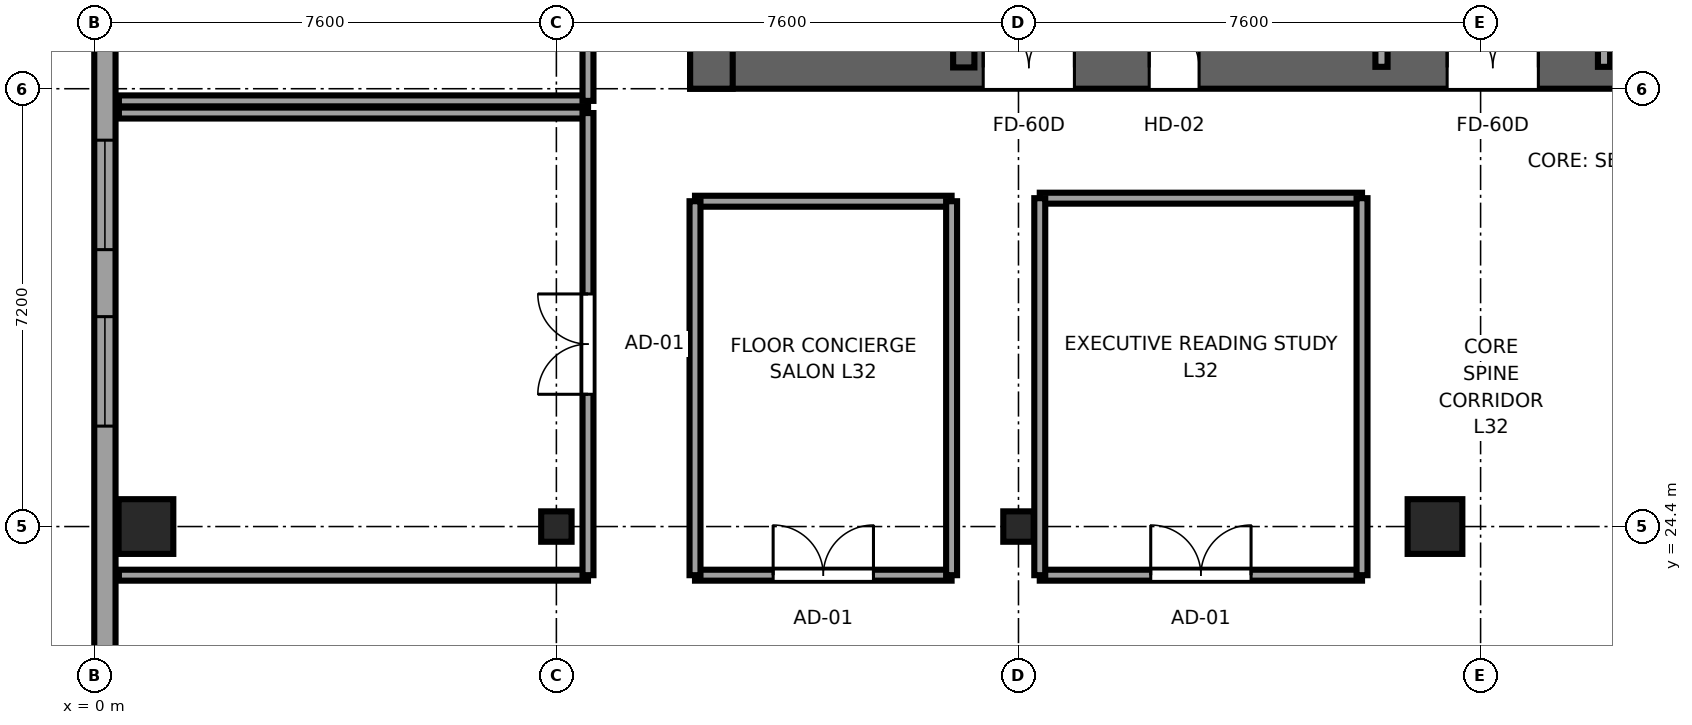
"""IFC4 building model, lengths in metres.
Left out: names, types, materials, properties, quantities, classifications, styles, units other than length and angle.
Written with IfcOpenShell. Run it as: python <this file> out.ifc"""

import sys

from ifc_helpers import new_model, si_unit, direction, frame, frame_2d, origin, origin_2d, place, context, subcontext, project, spatial, rectangle, i_section, extrude, source, transform, mapped, element, fill, save


model = new_model("IFC4")
c1 = context("Model", 3, precision=1e-05, world=origin(), true_north=direction((0.0, 1.0)))
c2 = subcontext(c1, "Body", "Model", "MODEL_VIEW")
j1 = project(units=[si_unit("LENGTHUNIT", "METRE"), si_unit("PLANEANGLEUNIT", "RADIAN")], contexts=[c1])
p1 = place(None, origin())
s1 = spatial("IfcSite", under=j1, at=p1, CompositionType="ELEMENT")
p2 = place(p1, origin())
s2 = spatial("IfcBuilding", under=s1, at=p2, CompositionType="ELEMENT")
p3 = place(p2, frame((0.0, 0.0, 125.75)))
s3 = spatial("IfcBuildingStorey", under=s2, at=p3, CompositionType="ELEMENT", Elevation=125.75)
p4 = place(p3, frame((9.8, 31.95, 0.0), z_axis=(0.0, 0.0, 1.0), x_axis=(1.0, 0.0, 0.0)))
e1 = element("IfcWall", 1, at=p4, inside=s3, PredefinedType="SHEAR", context=c2, shape_type="SweptSolid", body=[
    extrude(rectangle(XDim=26.4, YDim=0.7, at=frame_2d((13.2, 0.0))), origin(), (0.0, 0.0, 1.0), 3.55),
])
p5 = place(p4, frame((6.32, 0.0, 0.0), z_axis=(0.0, 0.0, 1.0), x_axis=(-1.0, 0.0, 0.0)))
e2 = element("IfcOpeningElement", 2, at=p5, cuts=e1, PredefinedType="OPENING", context=c2, shape_type="SweptSolid", body=[
    extrude(rectangle(XDim=1.5, YDim=2.04, at=frame_2d((0.75, 1.02))), frame((0.0, 0.36, 0.0), z_axis=(0.0, -1.0, 0.0), x_axis=(1.0, 0.0, 0.0)), (0.0, 0.0, 1.0), 0.72),
])
p6 = place(p4, frame((13.95, 0.0, 0.0), z_axis=(0.0, 0.0, 1.0), x_axis=(-1.0, 0.0, 0.0)))
e3 = element("IfcOpeningElement", 3, at=p6, cuts=e1, PredefinedType="OPENING", context=c2, shape_type="SweptSolid", body=[
    extrude(rectangle(XDim=1.5, YDim=2.04, at=frame_2d((0.75, 1.02))), frame((0.0, 0.36, 0.0), z_axis=(0.0, -1.0, 0.0), x_axis=(1.0, 0.0, 0.0)), (0.0, 0.0, 1.0), 0.72),
])
p7 = place(p4, frame((21.58, 0.0, 0.0), z_axis=(0.0, 0.0, 1.0), x_axis=(-1.0, 0.0, 0.0)))
e4 = element("IfcOpeningElement", 4, at=p7, cuts=e1, PredefinedType="OPENING", context=c2, shape_type="SweptSolid", body=[
    extrude(rectangle(XDim=1.5, YDim=2.04, at=frame_2d((0.75, 1.02))), frame((0.0, 0.36, 0.0), z_axis=(0.0, -1.0, 0.0), x_axis=(1.0, 0.0, 0.0)), (0.0, 0.0, 1.0), 0.72),
])
p8 = place(p4, frame((8.37, 0.0, 0.0), z_axis=(0.0, 0.0, 1.0), x_axis=(-1.0, 0.0, 0.0)))
e5 = element("IfcOpeningElement", 5, at=p8, cuts=e1, PredefinedType="OPENING", context=c2, shape_type="SweptSolid", body=[
    extrude(rectangle(XDim=0.82, YDim=2.01, at=frame_2d((0.41, 1.005))), frame((0.0, 0.36, 0.0), z_axis=(0.0, -1.0, 0.0), x_axis=(1.0, 0.0, 0.0)), (0.0, 0.0, 1.0), 0.72),
])
p9 = place(p4, frame((18.87, 0.0, 0.0), z_axis=(0.0, 0.0, 1.0), x_axis=(-1.0, 0.0, 0.0)))
e6 = element("IfcOpeningElement", 6, at=p9, cuts=e1, PredefinedType="OPENING", context=c2, shape_type="SweptSolid", body=[
    extrude(rectangle(XDim=0.82, YDim=2.01, at=frame_2d((0.41, 1.005))), frame((0.0, 0.36, 0.0), z_axis=(0.0, -1.0, 0.0), x_axis=(1.0, 0.0, 0.0)), (0.0, 0.0, 1.0), 0.72),
])
p10 = place(p3, frame((10.15, 31.6, 0.0), z_axis=(0.0, 0.0, 1.0), x_axis=(0.0, 1.0, 0.0)))
e7 = element("IfcWall", 7, at=p10, inside=s3, PredefinedType="SHEAR", context=c2, shape_type="SweptSolid", body=[
    extrude(rectangle(XDim=13.6, YDim=0.7, at=frame_2d((6.8, 0.0))), origin(), (0.0, 0.0, 1.0), 3.55),
])
p11 = place(p3, frame((14.3, 31.95, 0.0), z_axis=(0.0, 0.0, 1.0), x_axis=(0.0, 1.0, 0.0)))
e8 = element("IfcWall", 8, at=p11, inside=s3, PredefinedType="SHEAR", context=c2, shape_type="SweptSolid", body=[
    extrude(rectangle(XDim=12.9, YDim=0.35, at=frame_2d((6.45, 0.0))), origin(), (0.0, 0.0, 1.0), 3.55),
])
p12 = place(p11, frame((0.6, 0.0, 0.0)))
e9 = element("IfcOpeningElement", 9, at=p12, cuts=e8, PredefinedType="OPENING", context=c2, shape_type="SweptSolid", body=[
    extrude(rectangle(XDim=1.1, YDim=2.12, at=frame_2d((0.55, 1.06))), frame((0.0, 0.185, 0.0), z_axis=(0.0, -1.0, 0.0), x_axis=(1.0, 0.0, 0.0)), (0.0, 0.0, 1.0), 0.37),
])
m1 = source(origin(), c2, "Body", "SweptSolid", [
    extrude(rectangle(XDim=0.9, YDim=0.9, at=origin_2d()), origin(), (0.0, 0.0, 1.0), 3.55),
])
p13 = place(p3, frame((0.85, 24.4, 0.0), z_axis=(0.0, 0.0, 1.0), x_axis=(1.0, 0.0, 0.0)))
e10 = element("IfcColumn", 10, at=p13, inside=s3, PredefinedType="COLUMN", context=c2, shape_type="MappedRepresentation", body=[
    mapped(m1, transform((0.0, 0.0, 0.0), x_axis=(1.0, 0.0, 0.0), y_axis=(0.0, 1.0, 0.0), z_axis=(0.0, 0.0, 1.0), scale=1.0)),
])
m2 = source(origin(), c2, "Body", "SweptSolid", [
    extrude(i_section(OverallWidth=0.5, OverallDepth=0.5, WebThickness=0.022, FlangeThickness=0.034, at=origin_2d()), origin(), (0.0, 0.0, 1.0), 3.55),
])
for number, where, z_axis, x_axis in (
    (11, (7.6, 24.4, 0.0), (0.0, 0.0, 1.0), (1.0, 0.0, 0.0)),
    (12, (15.2, 24.4, 0.0), (0.0, 0.0, 1.0), (1.0, 0.0, 0.0)),
):
    element("IfcColumn", number, at=place(p3, frame(where, z_axis=z_axis, x_axis=x_axis)), inside=s3, PredefinedType="COLUMN", context=c2, shape_type="MappedRepresentation", body=[
        mapped(m2, transform((0.0, 0.0, 0.0), x_axis=(1.0, 0.0, 0.0), y_axis=(0.0, 1.0, 0.0), z_axis=(0.0, 0.0, 1.0), scale=1.0)),
    ])
p14 = place(p3, frame((22.05, 24.4, 0.0), z_axis=(0.0, 0.0, 1.0), x_axis=(1.0, 0.0, 0.0)))
e13 = element("IfcColumn", 13, at=p14, inside=s3, PredefinedType="COLUMN", context=c2, shape_type="MappedRepresentation", body=[
    mapped(m1, transform((0.0, 0.0, 0.0), x_axis=(1.0, 0.0, 0.0), y_axis=(0.0, 1.0, 0.0), z_axis=(0.0, 0.0, 1.0), scale=1.0)),
])
p15 = place(p3, frame((0.175, 41.383, 0.0), z_axis=(0.0, 0.0, 1.0), x_axis=(0.0, -1.0, 0.0)))
e14 = element("IfcWall", 14, at=p15, inside=s3, PredefinedType="SOLIDWALL", context=c2, shape_type="SweptSolid", body=[
    extrude(rectangle(XDim=36.766, YDim=0.35, at=frame_2d((18.383, 0.0))), origin(), (0.0, 0.0, 1.0), 3.37),
])
p16 = place(p15, frame((0.626, 0.0, 0.68)))
e15 = element("IfcOpeningElement", 15, at=p16, cuts=e14, PredefinedType="OPENING", context=c2, shape_type="SweptSolid", body=[
    extrude(rectangle(XDim=1.8, YDim=1.85, at=frame_2d((0.9, 0.925))), frame((0.0, 0.185, 0.0), z_axis=(0.0, -1.0, 0.0), x_axis=(1.0, 0.0, 0.0)), (0.0, 0.0, 1.0), 0.37),
])
p17 = place(p15, frame((4.578, 0.0, 0.68)))
e16 = element("IfcOpeningElement", 16, at=p17, cuts=e14, PredefinedType="OPENING", context=c2, shape_type="SweptSolid", body=[
    extrude(rectangle(XDim=1.8, YDim=1.85, at=frame_2d((0.9, 0.925))), frame((0.0, 0.185, 0.0), z_axis=(0.0, -1.0, 0.0), x_axis=(1.0, 0.0, 0.0)), (0.0, 0.0, 1.0), 0.37),
])
p18 = place(p15, frame((10.629, 0.0, 0.68)))
e17 = element("IfcOpeningElement", 17, at=p18, cuts=e14, PredefinedType="OPENING", context=c2, shape_type="SweptSolid", body=[
    extrude(rectangle(XDim=1.8, YDim=1.85, at=frame_2d((0.9, 0.925))), frame((0.0, 0.185, 0.0), z_axis=(0.0, -1.0, 0.0), x_axis=(1.0, 0.0, 0.0)), (0.0, 0.0, 1.0), 0.37),
])
p19 = place(p15, frame((13.531, 0.0, 0.68)))
e18 = element("IfcOpeningElement", 18, at=p19, cuts=e14, PredefinedType="OPENING", context=c2, shape_type="SweptSolid", body=[
    extrude(rectangle(XDim=1.8, YDim=1.85, at=frame_2d((0.9, 0.925))), frame((0.0, 0.185, 0.0), z_axis=(0.0, -1.0, 0.0), x_axis=(1.0, 0.0, 0.0)), (0.0, 0.0, 1.0), 0.37),
])
p20 = place(p15, frame((21.435, 0.0, 0.68)))
e19 = element("IfcOpeningElement", 19, at=p20, cuts=e14, PredefinedType="OPENING", context=c2, shape_type="SweptSolid", body=[
    extrude(rectangle(XDim=1.8, YDim=1.85, at=frame_2d((0.9, 0.925))), frame((0.0, 0.185, 0.0), z_axis=(0.0, -1.0, 0.0), x_axis=(1.0, 0.0, 0.0)), (0.0, 0.0, 1.0), 0.37),
])
p21 = place(p15, frame((26.436, 0.0, 0.68)))
e20 = element("IfcOpeningElement", 20, at=p21, cuts=e14, PredefinedType="OPENING", context=c2, shape_type="SweptSolid", body=[
    extrude(rectangle(XDim=1.8, YDim=1.85, at=frame_2d((0.9, 0.925))), frame((0.0, 0.185, 0.0), z_axis=(0.0, -1.0, 0.0), x_axis=(1.0, 0.0, 0.0)), (0.0, 0.0, 1.0), 0.37),
])
p22 = place(p15, frame((34.34, 0.0, 0.68)))
e21 = element("IfcOpeningElement", 21, at=p22, cuts=e14, PredefinedType="OPENING", context=c2, shape_type="SweptSolid", body=[
    extrude(rectangle(XDim=1.8, YDim=1.85, at=frame_2d((0.9, 0.925))), frame((0.0, 0.185, 0.0), z_axis=(0.0, -1.0, 0.0), x_axis=(1.0, 0.0, 0.0)), (0.0, 0.0, 1.0), 0.37),
])
p23 = place(p3, frame((21.17, 31.96, 0.0), z_axis=(0.0, 0.0, 1.0), x_axis=(0.0, 1.0, 0.0)))
e22 = element("IfcWall", 22, at=p23, inside=s3, PredefinedType="SOLIDWALL", context=c2, shape_type="SweptSolid", body=[
    extrude(rectangle(XDim=12.58, YDim=0.2, at=frame_2d((6.29, 0.0))), origin(), (0.0, 0.0, 1.0), 3.37),
])
p24 = place(p23, frame((5.74, 0.0, 0.0)))
e23 = element("IfcOpeningElement", 23, at=p24, cuts=e22, PredefinedType="OPENING", context=c2, shape_type="SweptSolid", body=[
    extrude(rectangle(XDim=1.1, YDim=2.12, at=frame_2d((0.55, 1.06))), frame((0.0, 0.11, 0.0), z_axis=(0.0, -1.0, 0.0), x_axis=(1.0, 0.0, 0.0)), (0.0, 0.0, 1.0), 0.22),
])
p25 = place(p23, frame((8.24, 0.0, 0.0)))
e24 = element("IfcOpeningElement", 24, at=p25, cuts=e22, PredefinedType="OPENING", context=c2, shape_type="SweptSolid", body=[
    extrude(rectangle(XDim=1.1, YDim=2.12, at=frame_2d((0.55, 1.06))), frame((0.0, 0.11, 0.0), z_axis=(0.0, -1.0, 0.0), x_axis=(1.0, 0.0, 0.0)), (0.0, 0.0, 1.0), 0.22),
])
p26 = place(p3, frame((24.83, 31.96, 0.0), z_axis=(0.0, 0.0, 1.0), x_axis=(0.0, 1.0, 0.0)))
e25 = element("IfcWall", 25, at=p26, inside=s3, PredefinedType="SOLIDWALL", context=c2, shape_type="SweptSolid", body=[
    extrude(rectangle(XDim=12.58, YDim=0.2, at=frame_2d((6.29, 0.0))), origin(), (0.0, 0.0, 1.0), 3.37),
])
p27 = place(p26, frame((5.74, 0.0, 0.0)))
e26 = element("IfcOpeningElement", 26, at=p27, cuts=e25, PredefinedType="OPENING", context=c2, shape_type="SweptSolid", body=[
    extrude(rectangle(XDim=1.1, YDim=2.12, at=frame_2d((0.55, 1.06))), frame((0.0, 0.11, 0.0), z_axis=(0.0, -1.0, 0.0), x_axis=(1.0, 0.0, 0.0)), (0.0, 0.0, 1.0), 0.22),
])
p28 = place(p26, frame((8.24, 0.0, 0.0)))
e27 = element("IfcOpeningElement", 27, at=p28, cuts=e25, PredefinedType="OPENING", context=c2, shape_type="SweptSolid", body=[
    extrude(rectangle(XDim=1.1, YDim=2.12, at=frame_2d((0.55, 1.06))), frame((0.0, 0.11, 0.0), z_axis=(0.0, -1.0, 0.0), x_axis=(1.0, 0.0, 0.0)), (0.0, 0.0, 1.0), 0.22),
])
for number, where, z_axis, x_axis in (
    (28, (0.405, 23.6, 0.0), (0.0, 0.0, 1.0), (1.0, 0.0, 0.0)),
    (29, (0.405, 31.2, 0.0), (0.0, 0.0, 1.0), (1.0, 0.0, 0.0)),
):
    element("IfcWall", number, at=place(p3, frame(where, z_axis=z_axis, x_axis=x_axis)), inside=s3, PredefinedType="PARTITIONING", context=c2, shape_type="SweptSolid", body=[
        extrude(rectangle(XDim=7.715, YDim=0.18, at=frame_2d((3.857, 0.0))), origin(), (0.0, 0.0, 1.0), 3.37),
    ])
p29 = place(p3, frame((8.12, 23.6, 0.0), z_axis=(0.0, 0.0, 1.0), x_axis=(0.0, 1.0, 0.0)))
e30 = element("IfcWall", 30, at=p29, inside=s3, PredefinedType="PARTITIONING", context=c2, shape_type="SweptSolid", body=[
    extrude(rectangle(XDim=7.6, YDim=0.18, at=frame_2d((3.8, 0.0))), origin(), (0.0, 0.0, 1.0), 3.37),
])
p30 = place(p29, frame((2.975, 0.0, 0.0)))
e31 = element("IfcOpeningElement", 31, at=p30, cuts=e30, PredefinedType="OPENING", context=c2, shape_type="SweptSolid", body=[
    extrude(rectangle(XDim=1.65, YDim=2.15, at=frame_2d((0.825, 1.075))), frame((0.0, 0.1, 0.0), z_axis=(0.0, -1.0, 0.0), x_axis=(1.0, 0.0, 0.0)), (0.0, 0.0, 1.0), 0.2),
])
p31 = place(p3, frame((0.405, 31.4, 0.0), z_axis=(0.0, 0.0, 1.0), x_axis=(1.0, 0.0, 0.0)))
e32 = element("IfcWall", 32, at=p31, inside=s3, PredefinedType="PARTITIONING", context=c2, shape_type="SweptSolid", body=[
    extrude(rectangle(XDim=7.715, YDim=0.18, at=frame_2d((3.857, 0.0))), origin(), (0.0, 0.0, 1.0), 3.37),
])
p32 = place(p3, frame((8.12, 31.4, 0.0), z_axis=(0.0, 0.0, 1.0), x_axis=(0.0, 1.0, 0.0)))
e33 = element("IfcWall", 33, at=p32, inside=s3, PredefinedType="PARTITIONING", context=c2, shape_type="SweptSolid", body=[
    extrude(rectangle(XDim=6.8, YDim=0.18, at=frame_2d((3.4, 0.0))), origin(), (0.0, 0.0, 1.0), 3.37),
])
p33 = place(p32, frame((3.175, 0.0, 0.0)))
e34 = element("IfcOpeningElement", 34, at=p33, cuts=e33, PredefinedType="OPENING", context=c2, shape_type="SweptSolid", body=[
    extrude(rectangle(XDim=1.65, YDim=2.15, at=frame_2d((0.825, 1.075))), frame((0.0, 0.1, 0.0), z_axis=(0.0, -1.0, 0.0), x_axis=(1.0, 0.0, 0.0)), (0.0, 0.0, 1.0), 0.2),
])
p34 = place(p3, frame((9.88, 23.6, 0.0), z_axis=(0.0, 0.0, 1.0), x_axis=(1.0, 0.0, 0.0)))
e35 = element("IfcWall", 35, at=p34, inside=s3, PredefinedType="PARTITIONING", context=c2, shape_type="SweptSolid", body=[
    extrude(rectangle(XDim=4.22, YDim=0.18, at=frame_2d((2.11, 0.0))), origin(), (0.0, 0.0, 1.0), 3.37),
])
p35 = place(p34, frame((1.285, 0.0, 0.0)))
e36 = element("IfcOpeningElement", 36, at=p35, cuts=e35, PredefinedType="OPENING", context=c2, shape_type="SweptSolid", body=[
    extrude(rectangle(XDim=1.65, YDim=2.15, at=frame_2d((0.825, 1.075))), frame((0.0, 0.1, 0.0), z_axis=(0.0, -1.0, 0.0), x_axis=(1.0, 0.0, 0.0)), (0.0, 0.0, 1.0), 0.2),
])
p36 = place(p3, frame((9.88, 29.75, 0.0), z_axis=(0.0, 0.0, 1.0), x_axis=(1.0, 0.0, 0.0)))
e37 = element("IfcWall", 37, at=p36, inside=s3, PredefinedType="PARTITIONING", context=c2, shape_type="SweptSolid", body=[
    extrude(rectangle(XDim=4.22, YDim=0.18, at=frame_2d((2.11, 0.0))), origin(), (0.0, 0.0, 1.0), 3.37),
])
for number, where, z_axis, x_axis in (
    (38, (9.88, 23.6, 0.0), (0.0, 0.0, 1.0), (0.0, 1.0, 0.0)),
    (39, (14.1, 23.6, 0.0), (0.0, 0.0, 1.0), (0.0, 1.0, 0.0)),
):
    element("IfcWall", number, at=place(p3, frame(where, z_axis=z_axis, x_axis=x_axis)), inside=s3, PredefinedType="PARTITIONING", context=c2, shape_type="SweptSolid", body=[
        extrude(rectangle(XDim=6.15, YDim=0.18, at=frame_2d((3.075, 0.0))), origin(), (0.0, 0.0, 1.0), 3.37),
    ])
p37 = place(p3, frame((15.55, 23.6, 0.0), z_axis=(0.0, 0.0, 1.0), x_axis=(1.0, 0.0, 0.0)))
e40 = element("IfcWall", 40, at=p37, inside=s3, PredefinedType="PARTITIONING", context=c2, shape_type="SweptSolid", body=[
    extrude(rectangle(XDim=5.3, YDim=0.18, at=frame_2d((2.65, 0.0))), origin(), (0.0, 0.0, 1.0), 3.37),
])
p38 = place(p37, frame((1.825, 0.0, 0.0)))
e41 = element("IfcOpeningElement", 41, at=p38, cuts=e40, PredefinedType="OPENING", context=c2, shape_type="SweptSolid", body=[
    extrude(rectangle(XDim=1.65, YDim=2.15, at=frame_2d((0.825, 1.075))), frame((0.0, 0.1, 0.0), z_axis=(0.0, -1.0, 0.0), x_axis=(1.0, 0.0, 0.0)), (0.0, 0.0, 1.0), 0.2),
])
p39 = place(p3, frame((15.55, 29.8, 0.0), z_axis=(0.0, 0.0, 1.0), x_axis=(1.0, 0.0, 0.0)))
e42 = element("IfcWall", 42, at=p39, inside=s3, PredefinedType="PARTITIONING", context=c2, shape_type="SweptSolid", body=[
    extrude(rectangle(XDim=5.3, YDim=0.18, at=frame_2d((2.65, 0.0))), origin(), (0.0, 0.0, 1.0), 3.37),
])
for number, where, z_axis, x_axis in (
    (43, (15.55, 23.6, 0.0), (0.0, 0.0, 1.0), (0.0, 1.0, 0.0)),
    (44, (20.85, 23.6, 0.0), (0.0, 0.0, 1.0), (0.0, 1.0, 0.0)),
):
    element("IfcWall", number, at=place(p3, frame(where, z_axis=z_axis, x_axis=x_axis)), inside=s3, PredefinedType="PARTITIONING", context=c2, shape_type="SweptSolid", body=[
        extrude(rectangle(XDim=6.2, YDim=0.18, at=frame_2d((3.1, 0.0))), origin(), (0.0, 0.0, 1.0), 3.37),
    ])
m3 = source(origin(), c2, "Body", "SweptSolid", [
    extrude(rectangle(XDim=1.8, YDim=1.85, at=frame_2d((0.9, 0.925))), frame((0.0, 0.09, 0.0), z_axis=(0.0, -1.0, 0.0), x_axis=(1.0, 0.0, 0.0)), (0.0, 0.0, 1.0), 0.06),
])
p40 = place(p18, origin())
e45 = element("IfcWindow", 45, at=p40, inside=s3, PartitioningType="TRIPLE_PANEL_HORIZONTAL", PredefinedType="WINDOW", context=c2, shape_type="MappedRepresentation", body=[
    mapped(m3, transform((0.0, 0.0, 0.0), x_axis=(1.0, 0.0, 0.0), y_axis=(0.0, 1.0, 0.0), z_axis=(0.0, 0.0, 1.0), scale=1.0)),
])
fill(e17, e45)
p41 = place(p19, origin())
e46 = element("IfcWindow", 46, at=p41, inside=s3, PartitioningType="TRIPLE_PANEL_HORIZONTAL", PredefinedType="WINDOW", context=c2, shape_type="MappedRepresentation", body=[
    mapped(m3, transform((0.0, 0.0, 0.0), x_axis=(1.0, 0.0, 0.0), y_axis=(0.0, 1.0, 0.0), z_axis=(0.0, 0.0, 1.0), scale=1.0)),
])
fill(e18, e46)
m4 = source(origin(), c2, "Body", "SweptSolid", [
    extrude(rectangle(XDim=1.5, YDim=2.04, at=frame_2d((0.75, 1.02))), frame((0.0, 0.025, 0.0), z_axis=(0.0, -1.0, 0.0), x_axis=(1.0, 0.0, 0.0)), (0.0, 0.0, 1.0), 0.05),
])
p42 = place(p5, origin())
e47 = element("IfcDoor", 47, at=p42, inside=s3, OperationType="DOUBLE_DOOR_SINGLE_SWING", PredefinedType="DOOR", context=c2, shape_type="MappedRepresentation", body=[
    mapped(m4, transform((0.0, 0.0, 0.0), x_axis=(1.0, 0.0, 0.0), y_axis=(0.0, 1.0, 0.0), z_axis=(0.0, 0.0, 1.0), scale=1.0)),
])
fill(e2, e47)
p43 = place(p6, origin())
e48 = element("IfcDoor", 48, at=p43, inside=s3, OperationType="DOUBLE_DOOR_SINGLE_SWING", PredefinedType="DOOR", context=c2, shape_type="MappedRepresentation", body=[
    mapped(m4, transform((0.0, 0.0, 0.0), x_axis=(1.0, 0.0, 0.0), y_axis=(0.0, 1.0, 0.0), z_axis=(0.0, 0.0, 1.0), scale=1.0)),
])
fill(e3, e48)
m5 = source(origin(), c2, "Body", "SweptSolid", [
    extrude(rectangle(XDim=0.82, YDim=2.01, at=frame_2d((0.41, 1.005))), frame((0.0, 0.025, 0.0), z_axis=(0.0, -1.0, 0.0), x_axis=(1.0, 0.0, 0.0)), (0.0, 0.0, 1.0), 0.05),
])
p44 = place(p8, origin())
e49 = element("IfcDoor", 49, at=p44, inside=s3, OperationType="SINGLE_SWING_LEFT", PredefinedType="DOOR", context=c2, shape_type="MappedRepresentation", body=[
    mapped(m5, transform((0.0, 0.0, 0.0), x_axis=(1.0, 0.0, 0.0), y_axis=(0.0, 1.0, 0.0), z_axis=(0.0, 0.0, 1.0), scale=1.0)),
])
fill(e5, e49)
m6 = source(origin(), c2, "Body", "SweptSolid", [
    extrude(rectangle(XDim=1.65, YDim=2.15, at=frame_2d((0.825, 1.075))), frame((0.0, 0.025, 0.0), z_axis=(0.0, -1.0, 0.0), x_axis=(1.0, 0.0, 0.0)), (0.0, 0.0, 1.0), 0.05),
])
p45 = place(p30, origin())
e50 = element("IfcDoor", 50, at=p45, inside=s3, OperationType="DOUBLE_DOOR_SINGLE_SWING", PredefinedType="DOOR", context=c2, shape_type="MappedRepresentation", body=[
    mapped(m6, transform((0.0, 0.0, 0.0), x_axis=(1.0, 0.0, 0.0), y_axis=(0.0, 1.0, 0.0), z_axis=(0.0, 0.0, 1.0), scale=1.0)),
])
fill(e31, e50)
p46 = place(p35, origin())
e51 = element("IfcDoor", 51, at=p46, inside=s3, OperationType="DOUBLE_DOOR_SINGLE_SWING", PredefinedType="DOOR", context=c2, shape_type="MappedRepresentation", body=[
    mapped(m6, transform((0.0, 0.0, 0.0), x_axis=(1.0, 0.0, 0.0), y_axis=(0.0, 1.0, 0.0), z_axis=(0.0, 0.0, 1.0), scale=1.0)),
])
fill(e36, e51)
p47 = place(p38, origin())
e52 = element("IfcDoor", 52, at=p47, inside=s3, OperationType="DOUBLE_DOOR_SINGLE_SWING", PredefinedType="DOOR", context=c2, shape_type="MappedRepresentation", body=[
    mapped(m6, transform((0.0, 0.0, 0.0), x_axis=(1.0, 0.0, 0.0), y_axis=(0.0, 1.0, 0.0), z_axis=(0.0, 0.0, 1.0), scale=1.0)),
])
fill(e41, e52)
save(model, sys.argv[1])
